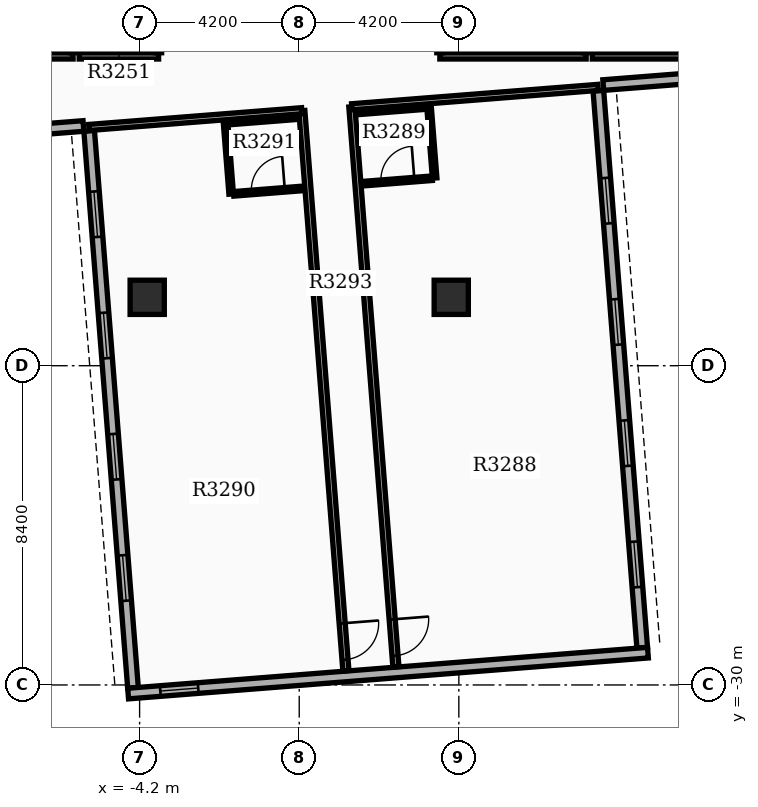
"""IFC4 building model, lengths in metres.
Left out: names, types, materials, properties, quantities, classifications, styles, units other than length and angle.
Written with IfcOpenShell. Run it as: python <this file> out.ifc"""

import sys

from ifc_helpers import new_model, si_unit, direction, frame, frame_2d, origin, origin_2d, place, context, subcontext, project, spatial, rectangle, extrude, element, fill, save


model = new_model("IFC4")
c1 = context("Model", 3, precision=1e-05, world=origin(), true_north=direction((0.0, 1.0)))
c2 = subcontext(c1, "Body", "Model", "MODEL_VIEW")
j1 = project(units=[si_unit("LENGTHUNIT", "METRE"), si_unit("PLANEANGLEUNIT", "RADIAN")], contexts=[c1])
p1 = place(None, origin())
s1 = spatial("IfcSite", under=j1, at=p1, CompositionType="ELEMENT")
p2 = place(p1, origin())
s2 = spatial("IfcBuilding", under=s1, at=p2, CompositionType="ELEMENT")
p3 = place(p2, frame((0.0, 0.0, 205.2)))
s3 = spatial("IfcBuildingStorey", under=s2, at=p3, CompositionType="ELEMENT", Elevation=205.2)
for number, where, z_axis, x_axis in (
    (1, (-4.0, -19.8, 0.0), (0.0, 0.0, 1.0), (1.0, 0.0, 0.0)),
    (2, (4.0, -19.8, 0.0), (0.0, 0.0, 1.0), (1.0, 0.0, 0.0)),
):
    element("IfcColumn", number, at=place(p3, frame(where, z_axis=z_axis, x_axis=x_axis)), inside=s3, PredefinedType="COLUMN", context=c2, shape_type="SweptSolid", body=[
        extrude(rectangle(XDim=0.9, YDim=0.9, at=origin_2d()), origin(), (0.0, 0.0, 1.0), 3.9),
    ])
p4 = place(p3, frame((-5.527, -15.421, 0.0), z_axis=(0.0, 0.0, 1.0), x_axis=(0.078456642068, -0.996917526837, 0.0)))
e3 = element("IfcWall", 3, at=p4, inside=s3, PredefinedType="STANDARD", context=c2, shape_type="SweptSolid", body=[
    extrude(rectangle(XDim=14.7, YDim=0.28, at=frame_2d((7.35, 0.0))), origin(), (0.0, 0.0, 1.0), 3.18),
])
p5 = place(p4, frame((1.6, 0.0, 0.8)))
e4 = element("IfcOpeningElement", 4, at=p5, cuts=e3, PredefinedType="OPENING", context=c2, shape_type="SweptSolid", body=[
    extrude(rectangle(XDim=1.2, YDim=1.6, at=frame_2d((0.6, 0.8))), frame((0.0, 0.15, 0.0), z_axis=(0.0, -1.0, 0.0), x_axis=(1.0, 0.0, 0.0)), (0.0, 0.0, 1.0), 0.3),
])
p6 = place(p4, frame((4.8, 0.0, 0.8)))
e5 = element("IfcOpeningElement", 5, at=p6, cuts=e3, PredefinedType="OPENING", context=c2, shape_type="SweptSolid", body=[
    extrude(rectangle(XDim=1.2, YDim=1.6, at=frame_2d((0.6, 0.8))), frame((0.0, 0.15, 0.0), z_axis=(0.0, -1.0, 0.0), x_axis=(1.0, 0.0, 0.0)), (0.0, 0.0, 1.0), 0.3),
])
p7 = place(p4, frame((8.0, 0.0, 0.8)))
e6 = element("IfcOpeningElement", 6, at=p7, cuts=e3, PredefinedType="OPENING", context=c2, shape_type="SweptSolid", body=[
    extrude(rectangle(XDim=1.2, YDim=1.6, at=frame_2d((0.6, 0.8))), frame((0.0, 0.15, 0.0), z_axis=(0.0, -1.0, 0.0), x_axis=(1.0, 0.0, 0.0)), (0.0, 0.0, 1.0), 0.3),
])
p8 = place(p4, frame((11.2, 0.0, 0.8)))
e7 = element("IfcOpeningElement", 7, at=p8, cuts=e3, PredefinedType="OPENING", context=c2, shape_type="SweptSolid", body=[
    extrude(rectangle(XDim=1.2, YDim=1.6, at=frame_2d((0.6, 0.8))), frame((0.0, 0.15, 0.0), z_axis=(0.0, -1.0, 0.0), x_axis=(1.0, 0.0, 0.0)), (0.0, 0.0, 1.0), 0.3),
])
p9 = place(p3, frame((9.025, -29.021, 0.0), z_axis=(0.0, 0.0, 1.0), x_axis=(-0.078456642068, 0.996917526837, 0.0)))
e8 = element("IfcWall", 8, at=p9, inside=s3, PredefinedType="STANDARD", context=c2, shape_type="SweptSolid", body=[
    extrude(rectangle(XDim=14.7, YDim=0.28, at=frame_2d((7.35, 0.0))), origin(), (0.0, 0.0, 1.0), 3.18),
])
p10 = place(p9, frame((1.6, 0.0, 0.8)))
e9 = element("IfcOpeningElement", 9, at=p10, cuts=e8, PredefinedType="OPENING", context=c2, shape_type="SweptSolid", body=[
    extrude(rectangle(XDim=1.2, YDim=1.6, at=frame_2d((0.6, 0.8))), frame((0.0, 0.15, 0.0), z_axis=(0.0, -1.0, 0.0), x_axis=(1.0, 0.0, 0.0)), (0.0, 0.0, 1.0), 0.3),
])
p11 = place(p9, frame((4.8, 0.0, 0.8)))
e10 = element("IfcOpeningElement", 10, at=p11, cuts=e8, PredefinedType="OPENING", context=c2, shape_type="SweptSolid", body=[
    extrude(rectangle(XDim=1.2, YDim=1.6, at=frame_2d((0.6, 0.8))), frame((0.0, 0.15, 0.0), z_axis=(0.0, -1.0, 0.0), x_axis=(1.0, 0.0, 0.0)), (0.0, 0.0, 1.0), 0.3),
])
p12 = place(p9, frame((8.0, 0.0, 0.8)))
e11 = element("IfcOpeningElement", 11, at=p12, cuts=e8, PredefinedType="OPENING", context=c2, shape_type="SweptSolid", body=[
    extrude(rectangle(XDim=1.2, YDim=1.6, at=frame_2d((0.6, 0.8))), frame((0.0, 0.15, 0.0), z_axis=(0.0, -1.0, 0.0), x_axis=(1.0, 0.0, 0.0)), (0.0, 0.0, 1.0), 0.3),
])
p13 = place(p9, frame((11.2, 0.0, 0.8)))
e12 = element("IfcOpeningElement", 12, at=p13, cuts=e8, PredefinedType="OPENING", context=c2, shape_type="SweptSolid", body=[
    extrude(rectangle(XDim=1.2, YDim=1.6, at=frame_2d((0.6, 0.8))), frame((0.0, 0.15, 0.0), z_axis=(0.0, -1.0, 0.0), x_axis=(1.0, 0.0, 0.0)), (0.0, 0.0, 1.0), 0.3),
])
p14 = place(p3, frame((-4.502, -30.226, 0.0), z_axis=(0.0, 0.0, 1.0), x_axis=(0.996917480881, 0.078457226018, 0.0)))
e13 = element("IfcWall", 13, at=p14, inside=s3, PredefinedType="STANDARD", context=c2, shape_type="SweptSolid", body=[
    extrude(rectangle(XDim=13.72, YDim=0.28, at=frame_2d((6.86, 0.0))), origin(), (0.0, 0.0, 1.0), 3.18),
])
p15 = place(p14, frame((0.85, 0.0, 0.85)))
e14 = element("IfcOpeningElement", 14, at=p15, cuts=e13, PredefinedType="OPENING", context=c2, shape_type="SweptSolid", body=[
    extrude(rectangle(XDim=1.0, YDim=1.5, at=frame_2d((0.5, 0.75))), frame((0.0, 0.15, 0.0), z_axis=(0.0, -1.0, 0.0), x_axis=(1.0, 0.0, 0.0)), (0.0, 0.0, 1.0), 0.3),
])
p16 = place(p3, frame((-11.958, -15.787, 0.0), z_axis=(0.0, 0.0, 1.0), x_axis=(0.996916125428, 0.078474447191, 0.0)))
e15 = element("IfcWall", 15, at=p16, inside=s3, PredefinedType="STANDARD", context=c2, shape_type="SweptSolid", body=[
    extrude(rectangle(XDim=6.3, YDim=0.28, at=frame_2d((3.15, 0.0))), origin(), (0.0, 0.0, 1.0), 3.18),
])
p17 = place(p3, frame((14.281, -13.722, 0.0), z_axis=(0.0, 0.0, 1.0), x_axis=(-0.99691915642, -0.078435932851, 0.0)))
e16 = element("IfcWall", 16, at=p17, inside=s3, PredefinedType="STANDARD", context=c2, shape_type="SweptSolid", body=[
    extrude(rectangle(XDim=6.3, YDim=0.28, at=frame_2d((3.15, 0.0))), origin(), (0.0, 0.0, 1.0), 3.18),
])
p18 = place(p3, frame((3.7, -13.45, 0.0), z_axis=(0.0, 0.0, 1.0), x_axis=(1.0, 0.0, 0.0)))
e17 = element("IfcWall", 17, at=p18, inside=s3, PredefinedType="PARTITIONING", context=c2, shape_type="SweptSolid", body=[
    extrude(rectangle(XDim=3.85, YDim=0.16, at=frame_2d((1.925, 0.0))), origin(), (0.0, 0.0, 1.0), 3.17),
])
for number, where, z_axis, x_axis in (
    (18, (3.7, -13.365, 0.0), (0.0, 0.0, 1.0), (0.0, 1.0, 0.0)),
    (19, (7.55, -13.365, 0.0), (0.0, 0.0, 1.0), (0.0, 1.0, 0.0)),
):
    element("IfcWall", number, at=place(p3, frame(where, z_axis=z_axis, x_axis=x_axis)), inside=s3, PredefinedType="PARTITIONING", context=c2, shape_type="SweptSolid", body=[
        extrude(rectangle(XDim=1.83, YDim=0.16, at=frame_2d((0.915, 0.0))), origin(), (0.0, 0.0, 1.0), 3.17),
    ])
p19 = place(p3, frame((7.71, -13.45, 0.0), z_axis=(0.0, 0.0, 1.0), x_axis=(1.0, 0.0, 0.0)))
e20 = element("IfcWall", 20, at=p19, inside=s3, PredefinedType="PARTITIONING", context=c2, shape_type="SweptSolid", body=[
    extrude(rectangle(XDim=3.29, YDim=0.16, at=frame_2d((1.645, 0.0))), origin(), (0.0, 0.0, 1.0), 3.17),
])
p20 = place(p3, frame((-7.89, -13.45, 0.0), z_axis=(0.0, 0.0, 1.0), x_axis=(1.0, 0.0, 0.0)))
e21 = element("IfcWall", 21, at=p20, inside=s3, PredefinedType="PARTITIONING", context=c2, shape_type="SweptSolid", body=[
    extrude(rectangle(XDim=1.94, YDim=0.16, at=frame_2d((0.97, 0.0))), origin(), (0.0, 0.0, 1.0), 3.17),
])
p21 = place(p3, frame((-5.95, -13.365, 0.0), z_axis=(0.0, 0.0, 1.0), x_axis=(0.0, 1.0, 0.0)))
e22 = element("IfcWall", 22, at=p21, inside=s3, PredefinedType="PARTITIONING", context=c2, shape_type="SweptSolid", body=[
    extrude(rectangle(XDim=1.83, YDim=0.16, at=frame_2d((0.915, 0.0))), origin(), (0.0, 0.0, 1.0), 3.17),
])
p22 = place(p3, frame((-5.79, -13.45, 0.0), z_axis=(0.0, 0.0, 1.0), x_axis=(1.0, 0.0, 0.0)))
e23 = element("IfcWall", 23, at=p22, inside=s3, PredefinedType="PARTITIONING", context=c2, shape_type="SweptSolid", body=[
    extrude(rectangle(XDim=2.09, YDim=0.16, at=frame_2d((1.045, 0.0))), origin(), (0.0, 0.0, 1.0), 3.17),
])
p23 = place(p3, frame((-3.7, -13.365, 0.0), z_axis=(0.0, 0.0, 1.0), x_axis=(0.0, 1.0, 0.0)))
e24 = element("IfcWall", 24, at=p23, inside=s3, PredefinedType="PARTITIONING", context=c2, shape_type="SweptSolid", body=[
    extrude(rectangle(XDim=1.83, YDim=0.16, at=frame_2d((0.915, 0.0))), origin(), (0.0, 0.0, 1.0), 3.17),
])
p24 = place(p3, frame((1.385, -14.787, 0.0), z_axis=(0.0, 0.0, 1.0), x_axis=(0.078451955012, -0.996917895694, 0.0)))
e25 = element("IfcWall", 25, at=p24, inside=s3, PredefinedType="PARTITIONING", context=c2, shape_type="SweptSolid", body=[
    extrude(rectangle(XDim=14.782, YDim=0.16, at=frame_2d((7.391, 0.0))), origin(), (0.0, 0.0, 1.0), 3.17),
])
p25 = place(p24, frame((13.53, 0.0, 0.0)))
e26 = element("IfcOpeningElement", 26, at=p25, cuts=e25, PredefinedType="OPENING", context=c2, shape_type="SweptSolid", body=[
    extrude(rectangle(XDim=0.96, YDim=2.15, at=frame_2d((0.48, 1.075))), frame((0.0, 0.09, 0.0), z_axis=(0.0, -1.0, 0.0), x_axis=(1.0, 0.0, 0.0)), (0.0, 0.0, 1.0), 0.18),
])
p26 = place(p3, frame((1.385, -14.787, 0.0), z_axis=(0.0, 0.0, 1.0), x_axis=(0.996917042006, 0.078462802379, 0.0)))
e27 = element("IfcWall", 27, at=p26, inside=s3, PredefinedType="PARTITIONING", context=c2, shape_type="SweptSolid", body=[
    extrude(rectangle(XDim=6.5, YDim=0.16, at=frame_2d((3.25, 0.0))), origin(), (0.0, 0.0, 1.0), 3.17),
])
p27 = place(p3, frame((1.684, -16.81, 0.0), z_axis=(0.0, 0.0, 1.0), x_axis=(0.996916400774, 0.0784709492, 0.0)))
e28 = element("IfcWall", 28, at=p27, inside=s3, PredefinedType="PARTITIONING", context=c2, shape_type="SweptSolid", body=[
    extrude(rectangle(XDim=1.82, YDim=0.12, at=frame_2d((0.91, 0.0))), origin(), (0.0, 0.0, 1.0), 3.17),
])
p28 = place(p27, frame((0.47, 0.0, 0.0)))
e29 = element("IfcOpeningElement", 29, at=p28, cuts=e28, PredefinedType="OPENING", context=c2, shape_type="SweptSolid", body=[
    extrude(rectangle(XDim=0.88, YDim=2.1, at=frame_2d((0.44, 1.05))), frame((0.0, 0.07, 0.0), z_axis=(0.0, -1.0, 0.0), x_axis=(1.0, 0.0, 0.0)), (0.0, 0.0, 1.0), 0.14),
])
p29 = place(p3, frame((1.537, -14.936, 0.0), z_axis=(0.0, 0.0, 1.0), x_axis=(0.996916400774, 0.0784709492, 0.0)))
e30 = element("IfcWall", 30, at=p29, inside=s3, PredefinedType="PARTITIONING", context=c2, shape_type="SweptSolid", body=[
    extrude(rectangle(XDim=1.82, YDim=0.12, at=frame_2d((0.91, 0.0))), origin(), (0.0, 0.0, 1.0), 3.17),
])
p30 = place(p3, frame((3.416, -14.788, 0.0), z_axis=(0.0, 0.0, 1.0), x_axis=(0.07843418698, -0.996919293781, 0.0)))
e31 = element("IfcWall", 31, at=p30, inside=s3, PredefinedType="PARTITIONING", context=c2, shape_type="SweptSolid", body=[
    extrude(rectangle(XDim=1.88, YDim=0.12, at=frame_2d((0.94, 0.0))), origin(), (0.0, 0.0, 1.0), 3.17),
])
p31 = place(p3, frame((0.069, -14.89, 0.0), z_axis=(0.0, 0.0, 1.0), x_axis=(0.078450663299, -0.996917997344, 0.0)))
e32 = element("IfcWall", 32, at=p31, inside=s3, PredefinedType="PARTITIONING", context=c2, shape_type="SweptSolid", body=[
    extrude(rectangle(XDim=14.782, YDim=0.16, at=frame_2d((7.391, 0.0))), origin(), (0.0, 0.0, 1.0), 3.17),
])
p32 = place(p31, frame((13.53, 0.0, 0.0)))
e33 = element("IfcOpeningElement", 33, at=p32, cuts=e32, PredefinedType="OPENING", context=c2, shape_type="SweptSolid", body=[
    extrude(rectangle(XDim=0.96, YDim=2.15, at=frame_2d((0.48, 1.075))), frame((0.0, 0.09, 0.0), z_axis=(0.0, -1.0, 0.0), x_axis=(1.0, 0.0, 0.0)), (0.0, 0.0, 1.0), 0.18),
])
p33 = place(p3, frame((0.069, -14.89, 0.0), z_axis=(0.0, 0.0, 1.0), x_axis=(-0.996914361549, -0.078496851772, 0.0)))
e34 = element("IfcWall", 34, at=p33, inside=s3, PredefinedType="PARTITIONING", context=c2, shape_type="SweptSolid", body=[
    extrude(rectangle(XDim=5.62, YDim=0.16, at=frame_2d((2.81, 0.0))), origin(), (0.0, 0.0, 1.0), 3.17),
])
p34 = place(p3, frame((-1.725, -17.078, 0.0), z_axis=(0.0, 0.0, 1.0), x_axis=(0.996926885478, 0.078337634704, 0.0)))
e35 = element("IfcWall", 35, at=p34, inside=s3, PredefinedType="PARTITIONING", context=c2, shape_type="SweptSolid", body=[
    extrude(rectangle(XDim=1.82, YDim=0.12, at=frame_2d((0.91, 0.0))), origin(), (0.0, 0.0, 1.0), 3.17),
])
p35 = place(p34, frame((0.47, 0.0, 0.0)))
e36 = element("IfcOpeningElement", 36, at=p35, cuts=e35, PredefinedType="OPENING", context=c2, shape_type="SweptSolid", body=[
    extrude(rectangle(XDim=0.88, YDim=2.1, at=frame_2d((0.44, 1.05))), frame((0.0, 0.07, 0.0), z_axis=(0.0, -1.0, 0.0), x_axis=(1.0, 0.0, 0.0)), (0.0, 0.0, 1.0), 0.14),
])
p36 = place(p3, frame((-1.873, -15.204, 0.0), z_axis=(0.0, 0.0, 1.0), x_axis=(0.996915574626, 0.078481444107, 0.0)))
e37 = element("IfcWall", 37, at=p36, inside=s3, PredefinedType="PARTITIONING", context=c2, shape_type="SweptSolid", body=[
    extrude(rectangle(XDim=1.82, YDim=0.12, at=frame_2d((0.91, 0.0))), origin(), (0.0, 0.0, 1.0), 3.17),
])
p37 = place(p3, frame((-1.938, -15.209, 0.0), z_axis=(0.0, 0.0, 1.0), x_axis=(0.078444342213, -0.99691849475, 0.0)))
e38 = element("IfcWall", 38, at=p37, inside=s3, PredefinedType="PARTITIONING", context=c2, shape_type="SweptSolid", body=[
    extrude(rectangle(XDim=1.88, YDim=0.12, at=frame_2d((0.94, 0.0))), origin(), (0.0, 0.0, 1.0), 3.17),
])
p38 = place(p5, origin())
e39 = element("IfcWindow", 39, at=p38, inside=s3, PartitioningType="SINGLE_PANEL", PredefinedType="WINDOW", context=c2, shape_type="SweptSolid", body=[
    extrude(rectangle(XDim=1.2, YDim=1.6, at=frame_2d((0.6, 0.8))), frame((0.0, 0.03, 0.0), z_axis=(0.0, -1.0, 0.0), x_axis=(1.0, 0.0, 0.0)), (0.0, 0.0, 1.0), 0.06),
])
fill(e4, e39)
p39 = place(p6, origin())
e40 = element("IfcWindow", 40, at=p39, inside=s3, PartitioningType="SINGLE_PANEL", PredefinedType="WINDOW", context=c2, shape_type="SweptSolid", body=[
    extrude(rectangle(XDim=1.2, YDim=1.6, at=frame_2d((0.6, 0.8))), frame((0.0, 0.03, 0.0), z_axis=(0.0, -1.0, 0.0), x_axis=(1.0, 0.0, 0.0)), (0.0, 0.0, 1.0), 0.06),
])
fill(e5, e40)
p40 = place(p7, origin())
e41 = element("IfcWindow", 41, at=p40, inside=s3, PartitioningType="SINGLE_PANEL", PredefinedType="WINDOW", context=c2, shape_type="SweptSolid", body=[
    extrude(rectangle(XDim=1.2, YDim=1.6, at=frame_2d((0.6, 0.8))), frame((0.0, 0.03, 0.0), z_axis=(0.0, -1.0, 0.0), x_axis=(1.0, 0.0, 0.0)), (0.0, 0.0, 1.0), 0.06),
])
fill(e6, e41)
p41 = place(p8, origin())
e42 = element("IfcWindow", 42, at=p41, inside=s3, PartitioningType="SINGLE_PANEL", PredefinedType="WINDOW", context=c2, shape_type="SweptSolid", body=[
    extrude(rectangle(XDim=1.2, YDim=1.6, at=frame_2d((0.6, 0.8))), frame((0.0, 0.03, 0.0), z_axis=(0.0, -1.0, 0.0), x_axis=(1.0, 0.0, 0.0)), (0.0, 0.0, 1.0), 0.06),
])
fill(e7, e42)
p42 = place(p10, origin())
e43 = element("IfcWindow", 43, at=p42, inside=s3, PartitioningType="SINGLE_PANEL", PredefinedType="WINDOW", context=c2, shape_type="SweptSolid", body=[
    extrude(rectangle(XDim=1.2, YDim=1.6, at=frame_2d((0.6, 0.8))), frame((0.0, 0.03, 0.0), z_axis=(0.0, -1.0, 0.0), x_axis=(1.0, 0.0, 0.0)), (0.0, 0.0, 1.0), 0.06),
])
fill(e9, e43)
p43 = place(p11, origin())
e44 = element("IfcWindow", 44, at=p43, inside=s3, PartitioningType="SINGLE_PANEL", PredefinedType="WINDOW", context=c2, shape_type="SweptSolid", body=[
    extrude(rectangle(XDim=1.2, YDim=1.6, at=frame_2d((0.6, 0.8))), frame((0.0, 0.03, 0.0), z_axis=(0.0, -1.0, 0.0), x_axis=(1.0, 0.0, 0.0)), (0.0, 0.0, 1.0), 0.06),
])
fill(e10, e44)
p44 = place(p12, origin())
e45 = element("IfcWindow", 45, at=p44, inside=s3, PartitioningType="SINGLE_PANEL", PredefinedType="WINDOW", context=c2, shape_type="SweptSolid", body=[
    extrude(rectangle(XDim=1.2, YDim=1.6, at=frame_2d((0.6, 0.8))), frame((0.0, 0.03, 0.0), z_axis=(0.0, -1.0, 0.0), x_axis=(1.0, 0.0, 0.0)), (0.0, 0.0, 1.0), 0.06),
])
fill(e11, e45)
p45 = place(p13, origin())
e46 = element("IfcWindow", 46, at=p45, inside=s3, PartitioningType="SINGLE_PANEL", PredefinedType="WINDOW", context=c2, shape_type="SweptSolid", body=[
    extrude(rectangle(XDim=1.2, YDim=1.6, at=frame_2d((0.6, 0.8))), frame((0.0, 0.03, 0.0), z_axis=(0.0, -1.0, 0.0), x_axis=(1.0, 0.0, 0.0)), (0.0, 0.0, 1.0), 0.06),
])
fill(e12, e46)
p46 = place(p15, origin())
e47 = element("IfcWindow", 47, at=p46, inside=s3, PartitioningType="SINGLE_PANEL", PredefinedType="WINDOW", context=c2, shape_type="SweptSolid", body=[
    extrude(rectangle(XDim=1.0, YDim=1.5, at=frame_2d((0.5, 0.75))), frame((0.0, 0.03, 0.0), z_axis=(0.0, -1.0, 0.0), x_axis=(1.0, 0.0, 0.0)), (0.0, 0.0, 1.0), 0.06),
])
fill(e14, e47)
p47 = place(p25, origin())
e48 = element("IfcDoor", 48, at=p47, inside=s3, OperationType="SINGLE_SWING_LEFT", PredefinedType="DOOR", context=c2, shape_type="SweptSolid", body=[
    extrude(rectangle(XDim=0.96, YDim=2.15, at=frame_2d((0.48, 1.075))), frame((0.0, 0.025, 0.0), z_axis=(0.0, -1.0, 0.0), x_axis=(1.0, 0.0, 0.0)), (0.0, 0.0, 1.0), 0.05),
])
fill(e26, e48)
p48 = place(p28, origin())
e49 = element("IfcDoor", 49, at=p48, inside=s3, OperationType="SINGLE_SWING_RIGHT", PredefinedType="DOOR", context=c2, shape_type="SweptSolid", body=[
    extrude(rectangle(XDim=0.88, YDim=2.1, at=frame_2d((0.44, 1.05))), frame((0.0, 0.025, 0.0), z_axis=(0.0, -1.0, 0.0), x_axis=(1.0, 0.0, 0.0)), (0.0, 0.0, 1.0), 0.05),
])
fill(e29, e49)
p49 = place(p32, origin())
e50 = element("IfcDoor", 50, at=p49, inside=s3, OperationType="SINGLE_SWING_LEFT", PredefinedType="DOOR", context=c2, shape_type="SweptSolid", body=[
    extrude(rectangle(XDim=0.96, YDim=2.15, at=frame_2d((0.48, 1.075))), frame((0.0, 0.025, 0.0), z_axis=(0.0, -1.0, 0.0), x_axis=(1.0, 0.0, 0.0)), (0.0, 0.0, 1.0), 0.05),
])
fill(e33, e50)
p50 = place(p35, origin())
e51 = element("IfcDoor", 51, at=p50, inside=s3, OperationType="SINGLE_SWING_RIGHT", PredefinedType="DOOR", context=c2, shape_type="SweptSolid", body=[
    extrude(rectangle(XDim=0.88, YDim=2.1, at=frame_2d((0.44, 1.05))), frame((0.0, 0.025, 0.0), z_axis=(0.0, -1.0, 0.0), x_axis=(1.0, 0.0, 0.0)), (0.0, 0.0, 1.0), 0.05),
])
fill(e36, e51)
save(model, sys.argv[1])
